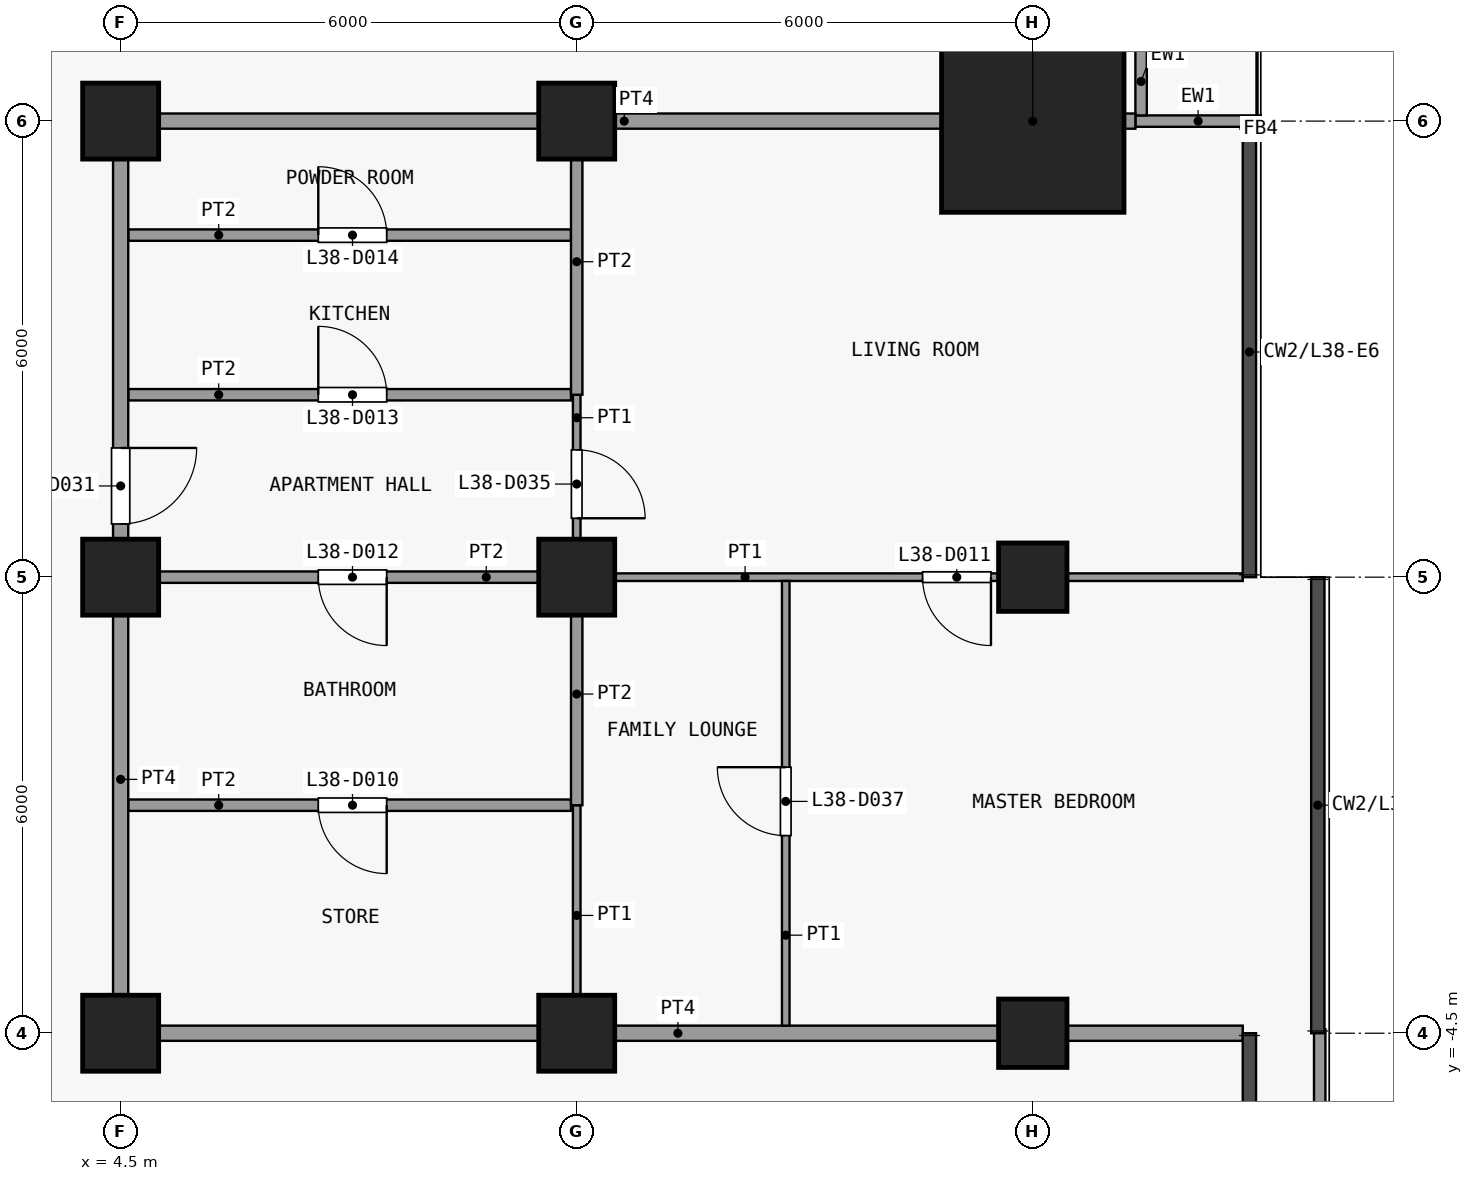
"""IFC4 building model, lengths in metres.
Left out: names, types, materials, properties, quantities, classifications, styles, units other than length and angle.
Written with IfcOpenShell. Run it as: python <this file> out.ifc"""

import sys

from ifc_helpers import new_model, si_unit, direction, frame, frame_2d, origin, origin_2d, place, context, subcontext, project, spatial, rectangle, extrude, element, fill, save


model = new_model("IFC4")
c1 = context("Model", 3, precision=1e-05, world=origin(), true_north=direction((0.0, 1.0)))
c2 = subcontext(c1, "Body", "Model", "MODEL_VIEW")
j1 = project(units=[si_unit("LENGTHUNIT", "METRE"), si_unit("PLANEANGLEUNIT", "RADIAN")], contexts=[c1])
p1 = place(None, origin())
s1 = spatial("IfcSite", under=j1, at=p1, CompositionType="ELEMENT")
p2 = place(p1, origin())
s2 = spatial("IfcBuilding", under=s1, at=p2, CompositionType="ELEMENT")
p3 = place(p2, frame((0.0, 0.0, 156.5)))
s3 = spatial("IfcBuildingStorey", under=s2, at=p3, CompositionType="ELEMENT", Elevation=156.5)
for number, where, z_axis, x_axis in (
    (1, (4.5, -4.5, 0.0), (0.0, 0.0, 1.0), (1.0, 0.0, 0.0)),
    (2, (4.5, 1.5, 0.0), (0.0, 0.0, 1.0), (1.0, 0.0, 0.0)),
    (3, (4.5, 7.5, 0.0), (0.0, 0.0, 1.0), (1.0, 0.0, 0.0)),
    (4, (10.5, -4.5, 0.0), (0.0, 0.0, 1.0), (1.0, 0.0, 0.0)),
    (5, (10.5, 1.5, 0.0), (0.0, 0.0, 1.0), (1.0, 0.0, 0.0)),
    (6, (10.5, 7.5, 0.0), (0.0, 0.0, 1.0), (1.0, 0.0, 0.0)),
):
    element("IfcColumn", number, at=place(p3, frame(where, z_axis=z_axis, x_axis=x_axis)), inside=s3, PredefinedType="COLUMN", context=c2, shape_type="SweptSolid", body=[
        extrude(rectangle(XDim=1.0, YDim=1.0, at=origin_2d()), origin(), (0.0, 0.0, 1.0), 3.6),
    ])
for number, where, z_axis, x_axis in (
    (7, (16.5, -4.5, 0.0), (0.0, 0.0, 1.0), (1.0, 0.0, 0.0)),
    (8, (16.5, 1.5, 0.0), (0.0, 0.0, 1.0), (1.0, 0.0, 0.0)),
):
    element("IfcColumn", number, at=place(p3, frame(where, z_axis=z_axis, x_axis=x_axis)), inside=s3, PredefinedType="COLUMN", context=c2, shape_type="SweptSolid", body=[
        extrude(rectangle(XDim=0.9, YDim=0.9, at=origin_2d()), origin(), (0.0, 0.0, 1.0), 3.6),
    ])
p4 = place(p3, frame((16.5, 7.5, 0.0), z_axis=(0.0, 0.0, 1.0), x_axis=(1.0, 0.0, 0.0)))
e9 = element("IfcColumn", 9, at=p4, inside=s3, PredefinedType="COLUMN", context=c2, shape_type="SweptSolid", body=[
    extrude(rectangle(XDim=2.4, YDim=2.4, at=origin_2d()), origin(), (0.0, 0.0, 1.0), 3.6),
])
p5 = place(p3, frame((17.85, 7.5, 0.0), z_axis=(0.0, 0.0, 1.0), x_axis=(1.0, 0.0, 0.0)))
e10 = element("IfcWall", 10, at=p5, inside=s3, PredefinedType="SOLIDWALL", context=c2, shape_type="SweptSolid", body=[
    extrude(rectangle(XDim=1.65, YDim=0.15, at=frame_2d((0.825, 0.0))), origin(), (0.0, 0.0, 1.0), 3.3),
])
p6 = place(p3, frame((17.925, 13.425, 0.0), z_axis=(0.0, 0.0, 1.0), x_axis=(0.0, -1.0, 0.0)))
e11 = element("IfcWall", 11, at=p6, inside=s3, PredefinedType="SOLIDWALL", context=c2, shape_type="SweptSolid", body=[
    extrude(rectangle(XDim=5.85, YDim=0.15, at=frame_2d((2.925, 0.0))), origin(), (0.0, 0.0, 1.0), 3.3),
])
p7 = place(p6, frame((0.825, 0.0, 0.0)))
e12 = element("IfcOpeningElement", 12, at=p7, cuts=e11, PredefinedType="OPENING", context=c2, shape_type="SweptSolid", body=[
    extrude(rectangle(XDim=1.2, YDim=2.4, at=frame_2d((0.6, 1.2))), frame((0.0, 0.085, 0.0), z_axis=(0.0, -1.0, 0.0), x_axis=(1.0, 0.0, 0.0)), (0.0, 0.0, 1.0), 0.17),
])
p8 = place(p6, frame((3.038, 0.0, 0.9)))
e13 = element("IfcOpeningElement", 13, at=p8, cuts=e11, PredefinedType="OPENING", context=c2, shape_type="SweptSolid", body=[
    extrude(rectangle(XDim=1.8, YDim=2.1, at=frame_2d((0.9, 1.05))), frame((0.0, 0.085, 0.0), z_axis=(0.0, -1.0, 0.0), x_axis=(1.0, 0.0, 0.0)), (0.0, 0.0, 1.0), 0.17),
])
p9 = place(p3, frame((20.275, -4.448, 0.0), z_axis=(0.0, 0.0, 1.0), x_axis=(0.0, -1.0, 0.0)))
e14 = element("IfcWall", 14, at=p9, inside=s3, PredefinedType="PARAPET", context=c2, shape_type="SweptSolid", body=[
    extrude(rectangle(XDim=9.002, YDim=0.15, at=frame_2d((4.501, 0.0))), origin(), (0.0, 0.0, 1.0), 1.15),
])
p10 = place(p3, frame((4.4, -4.5, 0.0), z_axis=(0.0, 0.0, 1.0), x_axis=(1.0, 0.0, 0.0)))
e15 = element("IfcWall", 15, at=p10, inside=s3, PredefinedType="PARTITIONING", context=c2, shape_type="SweptSolid", body=[
    extrude(rectangle(XDim=14.863, YDim=0.2, at=frame_2d((7.431, 0.0))), origin(), (0.0, 0.0, 1.0), 3.3),
])
p11 = place(p3, frame((4.6, -1.5, 0.0), z_axis=(0.0, 0.0, 1.0), x_axis=(1.0, 0.0, 0.0)))
e16 = element("IfcWall", 16, at=p11, inside=s3, PredefinedType="PARTITIONING", context=c2, shape_type="SweptSolid", body=[
    extrude(rectangle(XDim=5.825, YDim=0.15, at=frame_2d((2.913, 0.0))), origin(), (0.0, 0.0, 1.0), 3.3),
])
p12 = place(p11, frame((2.5, 0.0, 0.0)))
e17 = element("IfcOpeningElement", 17, at=p12, cuts=e16, PredefinedType="OPENING", context=c2, shape_type="SweptSolid", body=[
    extrude(rectangle(XDim=0.9, YDim=2.1, at=frame_2d((0.45, 1.05))), frame((0.0, 0.085, 0.0), z_axis=(0.0, -1.0, 0.0), x_axis=(1.0, 0.0, 0.0)), (0.0, 0.0, 1.0), 0.17),
])
p13 = place(p3, frame((10.5, 1.5, 0.0), z_axis=(0.0, 0.0, 1.0), x_axis=(1.0, 0.0, 0.0)))
e18 = element("IfcWall", 18, at=p13, inside=s3, PredefinedType="PARTITIONING", context=c2, shape_type="SweptSolid", body=[
    extrude(rectangle(XDim=8.762, YDim=0.1, at=frame_2d((4.381, 0.0))), origin(), (0.0, 0.0, 1.0), 3.3),
])
p14 = place(p13, frame((4.55, 0.0, 0.0)))
e19 = element("IfcOpeningElement", 19, at=p14, cuts=e18, PredefinedType="OPENING", context=c2, shape_type="SweptSolid", body=[
    extrude(rectangle(XDim=0.9, YDim=2.1, at=frame_2d((0.45, 1.05))), frame((0.0, 0.06, 0.0), z_axis=(0.0, -1.0, 0.0), x_axis=(1.0, 0.0, 0.0)), (0.0, 0.0, 1.0), 0.12),
])
p15 = place(p3, frame((4.6, 1.5, 0.0), z_axis=(0.0, 0.0, 1.0), x_axis=(1.0, 0.0, 0.0)))
e20 = element("IfcWall", 20, at=p15, inside=s3, PredefinedType="PARTITIONING", context=c2, shape_type="SweptSolid", body=[
    extrude(rectangle(XDim=5.9, YDim=0.15, at=frame_2d((2.95, 0.0))), origin(), (0.0, 0.0, 1.0), 3.3),
])
p16 = place(p15, frame((2.5, 0.0, 0.0)))
e21 = element("IfcOpeningElement", 21, at=p16, cuts=e20, PredefinedType="OPENING", context=c2, shape_type="SweptSolid", body=[
    extrude(rectangle(XDim=0.9, YDim=2.1, at=frame_2d((0.45, 1.05))), frame((0.0, 0.085, 0.0), z_axis=(0.0, -1.0, 0.0), x_axis=(1.0, 0.0, 0.0)), (0.0, 0.0, 1.0), 0.17),
])
p17 = place(p3, frame((4.6, 3.9, 0.0), z_axis=(0.0, 0.0, 1.0), x_axis=(1.0, 0.0, 0.0)))
e22 = element("IfcWall", 22, at=p17, inside=s3, PredefinedType="PARTITIONING", context=c2, shape_type="SweptSolid", body=[
    extrude(rectangle(XDim=5.825, YDim=0.15, at=frame_2d((2.913, 0.0))), origin(), (0.0, 0.0, 1.0), 3.3),
])
p18 = place(p17, frame((2.5, 0.0, 0.0)))
e23 = element("IfcOpeningElement", 23, at=p18, cuts=e22, PredefinedType="OPENING", context=c2, shape_type="SweptSolid", body=[
    extrude(rectangle(XDim=0.9, YDim=2.1, at=frame_2d((0.45, 1.05))), frame((0.0, 0.085, 0.0), z_axis=(0.0, -1.0, 0.0), x_axis=(1.0, 0.0, 0.0)), (0.0, 0.0, 1.0), 0.17),
])
p19 = place(p3, frame((4.6, 6.0, 0.0), z_axis=(0.0, 0.0, 1.0), x_axis=(1.0, 0.0, 0.0)))
e24 = element("IfcWall", 24, at=p19, inside=s3, PredefinedType="PARTITIONING", context=c2, shape_type="SweptSolid", body=[
    extrude(rectangle(XDim=5.825, YDim=0.15, at=frame_2d((2.913, 0.0))), origin(), (0.0, 0.0, 1.0), 3.3),
])
p20 = place(p19, frame((2.5, 0.0, 0.0)))
e25 = element("IfcOpeningElement", 25, at=p20, cuts=e24, PredefinedType="OPENING", context=c2, shape_type="SweptSolid", body=[
    extrude(rectangle(XDim=0.9, YDim=2.1, at=frame_2d((0.45, 1.05))), frame((0.0, 0.085, 0.0), z_axis=(0.0, -1.0, 0.0), x_axis=(1.0, 0.0, 0.0)), (0.0, 0.0, 1.0), 0.17),
])
p21 = place(p3, frame((4.4, 7.5, 0.0), z_axis=(0.0, 0.0, 1.0), x_axis=(1.0, 0.0, 0.0)))
e26 = element("IfcWall", 26, at=p21, inside=s3, PredefinedType="PARTITIONING", context=c2, shape_type="SweptSolid", body=[
    extrude(rectangle(XDim=13.45, YDim=0.2, at=frame_2d((6.725, 0.0))), origin(), (0.0, 0.0, 1.0), 3.3),
])
p22 = place(p3, frame((4.5, -4.4, 0.0), z_axis=(0.0, 0.0, 1.0), x_axis=(0.0, 1.0, 0.0)))
e27 = element("IfcWall", 27, at=p22, inside=s3, PredefinedType="PARTITIONING", context=c2, shape_type="SweptSolid", body=[
    extrude(rectangle(XDim=11.8, YDim=0.2, at=frame_2d((5.9, 0.0))), origin(), (0.0, 0.0, 1.0), 3.3),
])
p23 = place(p22, frame((6.6, 0.0, 0.0)))
e28 = element("IfcOpeningElement", 28, at=p23, cuts=e27, PredefinedType="OPENING", context=c2, shape_type="SweptSolid", body=[
    extrude(rectangle(XDim=1.0, YDim=2.1, at=frame_2d((0.5, 1.05))), frame((0.0, 0.11, 0.0), z_axis=(0.0, -1.0, 0.0), x_axis=(1.0, 0.0, 0.0)), (0.0, 0.0, 1.0), 0.22),
])
p24 = place(p3, frame((10.5, -4.4, 0.0), z_axis=(0.0, 0.0, 1.0), x_axis=(0.0, 1.0, 0.0)))
e29 = element("IfcWall", 29, at=p24, inside=s3, PredefinedType="PARTITIONING", context=c2, shape_type="SweptSolid", body=[
    extrude(rectangle(XDim=2.9, YDim=0.1, at=frame_2d((1.45, 0.0))), origin(), (0.0, 0.0, 1.0), 3.3),
])
p25 = place(p3, frame((10.5, 1.575, 0.0), z_axis=(0.0, 0.0, 1.0), x_axis=(0.0, 1.0, 0.0)))
e30 = element("IfcWall", 30, at=p25, inside=s3, PredefinedType="PARTITIONING", context=c2, shape_type="SweptSolid", body=[
    extrude(rectangle(XDim=2.325, YDim=0.1, at=frame_2d((1.163, 0.0))), origin(), (0.0, 0.0, 1.0), 3.3),
])
p26 = place(p25, frame((0.7, 0.0, 0.0)))
e31 = element("IfcOpeningElement", 31, at=p26, cuts=e30, PredefinedType="OPENING", context=c2, shape_type="SweptSolid", body=[
    extrude(rectangle(XDim=0.9, YDim=2.1, at=frame_2d((0.45, 1.05))), frame((0.0, 0.06, 0.0), z_axis=(0.0, -1.0, 0.0), x_axis=(1.0, 0.0, 0.0)), (0.0, 0.0, 1.0), 0.12),
])
p27 = place(p3, frame((10.5, -1.5, 0.0), z_axis=(0.0, 0.0, 1.0), x_axis=(0.0, 1.0, 0.0)))
e32 = element("IfcWall", 32, at=p27, inside=s3, PredefinedType="PARTITIONING", context=c2, shape_type="SweptSolid", body=[
    extrude(rectangle(XDim=2.925, YDim=0.15, at=frame_2d((1.462, 0.0))), origin(), (0.0, 0.0, 1.0), 3.3),
])
p28 = place(p3, frame((10.5, 3.9, 0.0), z_axis=(0.0, 0.0, 1.0), x_axis=(0.0, 1.0, 0.0)))
e33 = element("IfcWall", 33, at=p28, inside=s3, PredefinedType="PARTITIONING", context=c2, shape_type="SweptSolid", body=[
    extrude(rectangle(XDim=3.5, YDim=0.15, at=frame_2d((1.75, 0.0))), origin(), (0.0, 0.0, 1.0), 3.3),
])
p29 = place(p3, frame((13.25, -4.4, 0.0), z_axis=(0.0, 0.0, 1.0), x_axis=(0.0, 1.0, 0.0)))
e34 = element("IfcWall", 34, at=p29, inside=s3, PredefinedType="PARTITIONING", context=c2, shape_type="SweptSolid", body=[
    extrude(rectangle(XDim=5.85, YDim=0.1, at=frame_2d((2.925, 0.0))), origin(), (0.0, 0.0, 1.0), 3.3),
])
p30 = place(p29, frame((2.5, 0.0, 0.0)))
e35 = element("IfcOpeningElement", 35, at=p30, cuts=e34, PredefinedType="OPENING", context=c2, shape_type="SweptSolid", body=[
    extrude(rectangle(XDim=0.9, YDim=2.1, at=frame_2d((0.45, 1.05))), frame((0.0, 0.06, 0.0), z_axis=(0.0, -1.0, 0.0), x_axis=(1.0, 0.0, 0.0)), (0.0, 0.0, 1.0), 0.12),
])
p31 = place(p12, origin())
e36 = element("IfcDoor", 36, at=p31, inside=s3, OperationType="SINGLE_SWING_RIGHT", PredefinedType="DOOR", context=c2, shape_type="SweptSolid", body=[
    extrude(rectangle(XDim=0.9, YDim=2.1, at=frame_2d((0.45, 1.05))), frame((0.0, 0.025, 0.0), z_axis=(0.0, -1.0, 0.0), x_axis=(1.0, 0.0, 0.0)), (0.0, 0.0, 1.0), 0.05),
])
fill(e17, e36)
p32 = place(p14, origin())
e37 = element("IfcDoor", 37, at=p32, inside=s3, OperationType="SINGLE_SWING_RIGHT", PredefinedType="DOOR", context=c2, shape_type="SweptSolid", body=[
    extrude(rectangle(XDim=0.9, YDim=2.1, at=frame_2d((0.45, 1.05))), frame((0.0, 0.025, 0.0), z_axis=(0.0, -1.0, 0.0), x_axis=(1.0, 0.0, 0.0)), (0.0, 0.0, 1.0), 0.05),
])
fill(e19, e37)
p33 = place(p16, origin())
e38 = element("IfcDoor", 38, at=p33, inside=s3, OperationType="SINGLE_SWING_RIGHT", PredefinedType="DOOR", context=c2, shape_type="SweptSolid", body=[
    extrude(rectangle(XDim=0.9, YDim=2.1, at=frame_2d((0.45, 1.05))), frame((0.0, 0.025, 0.0), z_axis=(0.0, -1.0, 0.0), x_axis=(1.0, 0.0, 0.0)), (0.0, 0.0, 1.0), 0.05),
])
fill(e21, e38)
p34 = place(p18, origin())
e39 = element("IfcDoor", 39, at=p34, inside=s3, OperationType="SINGLE_SWING_RIGHT", PredefinedType="DOOR", context=c2, shape_type="SweptSolid", body=[
    extrude(rectangle(XDim=0.9, YDim=2.1, at=frame_2d((0.45, 1.05))), frame((0.0, 0.025, 0.0), z_axis=(0.0, -1.0, 0.0), x_axis=(1.0, 0.0, 0.0)), (0.0, 0.0, 1.0), 0.05),
])
fill(e23, e39)
p35 = place(p20, origin())
e40 = element("IfcDoor", 40, at=p35, inside=s3, OperationType="SINGLE_SWING_RIGHT", PredefinedType="DOOR", context=c2, shape_type="SweptSolid", body=[
    extrude(rectangle(XDim=0.9, YDim=2.1, at=frame_2d((0.45, 1.05))), frame((0.0, 0.025, 0.0), z_axis=(0.0, -1.0, 0.0), x_axis=(1.0, 0.0, 0.0)), (0.0, 0.0, 1.0), 0.05),
])
fill(e25, e40)
p36 = place(p23, origin())
e41 = element("IfcDoor", 41, at=p36, inside=s3, OperationType="SINGLE_SWING_RIGHT", PredefinedType="DOOR", context=c2, shape_type="SweptSolid", body=[
    extrude(rectangle(XDim=1.0, YDim=2.1, at=frame_2d((0.5, 1.05))), frame((0.0, 0.025, 0.0), z_axis=(0.0, -1.0, 0.0), x_axis=(1.0, 0.0, 0.0)), (0.0, 0.0, 1.0), 0.05),
])
fill(e28, e41)
p37 = place(p26, origin())
e42 = element("IfcDoor", 42, at=p37, inside=s3, OperationType="SINGLE_SWING_LEFT", PredefinedType="DOOR", context=c2, shape_type="SweptSolid", body=[
    extrude(rectangle(XDim=0.9, YDim=2.1, at=frame_2d((0.45, 1.05))), frame((0.0, 0.025, 0.0), z_axis=(0.0, -1.0, 0.0), x_axis=(1.0, 0.0, 0.0)), (0.0, 0.0, 1.0), 0.05),
])
fill(e31, e42)
p38 = place(p30, origin())
e43 = element("IfcDoor", 43, at=p38, inside=s3, OperationType="SINGLE_SWING_LEFT", PredefinedType="DOOR", context=c2, shape_type="SweptSolid", body=[
    extrude(rectangle(XDim=0.9, YDim=2.1, at=frame_2d((0.45, 1.05))), frame((0.0, 0.025, 0.0), z_axis=(0.0, -1.0, 0.0), x_axis=(1.0, 0.0, 0.0)), (0.0, 0.0, 1.0), 0.05),
])
fill(e35, e43)
save(model, sys.argv[1])
